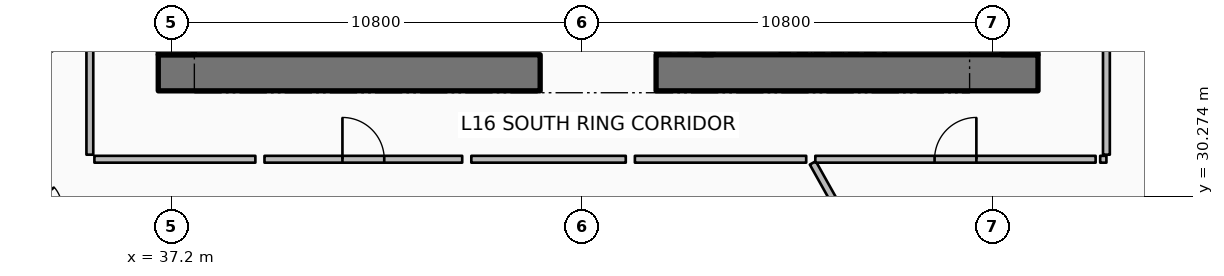
"""IFC4 building model, lengths in metres.
Left out: names, types, materials, properties, quantities, classifications, styles, units other than length and angle.
Written with IfcOpenShell. Run it as: python <this file> out.ifc"""

import sys

from ifc_helpers import new_model, si_unit, direction, frame, frame_2d, origin, place, context, subcontext, project, spatial, rectangle, extrude, element, fill, save


model = new_model("IFC4")
c1 = context("Model", 3, precision=1e-05, world=origin(), true_north=direction((0.0, 1.0)))
c2 = subcontext(c1, "Body", "Model", "MODEL_VIEW")
j1 = project(units=[si_unit("LENGTHUNIT", "METRE"), si_unit("PLANEANGLEUNIT", "RADIAN")], contexts=[c1])
p1 = place(None, origin())
s1 = spatial("IfcSite", under=j1, at=p1, CompositionType="ELEMENT")
p2 = place(p1, origin())
s2 = spatial("IfcBuilding", under=s1, at=p2, CompositionType="ELEMENT")
p3 = place(p2, frame((0.0, 0.0, 67.65)))
s3 = spatial("IfcBuildingStorey", under=s2, at=p3, CompositionType="ELEMENT", Elevation=67.65)
p4 = place(p3, frame((36.85, 33.525, 0.0), z_axis=(0.0, 0.0, 1.0), x_axis=(1.0, 0.0, 0.0)))
e1 = element("IfcWall", 1, at=p4, inside=s3, PredefinedType="SHEAR", context=c2, shape_type="SweptSolid", body=[
    extrude(rectangle(XDim=10.05, YDim=0.95, at=frame_2d((5.025, 0.0))), origin(), (0.0, 0.0, 1.0), 3.75),
])
p5 = place(p3, frame((49.95, 33.525, 0.0), z_axis=(0.0, 0.0, 1.0), x_axis=(1.0, 0.0, 0.0)))
e2 = element("IfcWall", 2, at=p5, inside=s3, PredefinedType="SHEAR", context=c2, shape_type="SweptSolid", body=[
    extrude(rectangle(XDim=10.05, YDim=0.95, at=frame_2d((5.025, 0.0))), origin(), (0.0, 0.0, 1.0), 3.75),
])
for number, where, z_axis, x_axis in (
    (3, (37.325, 34.0, 0.0), (0.0, 0.0, 1.0), (0.0, 1.0, 0.0)),
    (4, (59.525, 34.0, 0.0), (0.0, 0.0, 1.0), (0.0, 1.0, 0.0)),
):
    element("IfcWall", number, at=place(p3, frame(where, z_axis=z_axis, x_axis=x_axis)), inside=s3, PredefinedType="SHEAR", context=c2, shape_type="SweptSolid", body=[
        extrude(rectangle(XDim=16.0, YDim=0.95, at=frame_2d((8.0, 0.0))), origin(), (0.0, 0.0, 1.0), 3.75),
    ])
p6 = place(p3, frame((51.31, 34.0, 0.0), z_axis=(0.0, 0.0, 1.0), x_axis=(0.0, 1.0, 0.0)))
e5 = element("IfcWall", 5, at=p6, inside=s3, PredefinedType="SHEAR", context=c2, shape_type="SweptSolid", body=[
    extrude(rectangle(XDim=3.5, YDim=0.28, at=frame_2d((1.75, 0.0))), origin(), (0.0, 0.0, 1.0), 3.75),
])
p7 = place(p3, frame((34.954, 34.694, 0.0), z_axis=(0.0, 0.0, 1.0), x_axis=(-0.872493465611, -0.488625779577, 0.0)))
e6 = element("IfcWall", 6, at=p7, inside=s3, PredefinedType="PARTITIONING", context=c2, shape_type="SweptSolid", body=[
    extrude(rectangle(XDim=16.586, YDim=0.18, at=frame_2d((8.293, 0.0))), origin(), (0.0, 0.0, 1.0), 2.717),
])
p8 = place(p3, frame((54.074, 31.154, 0.0), z_axis=(0.0, 0.0, 1.0), x_axis=(0.48862612996, -0.872493269384, 0.0)))
e7 = element("IfcWall", 7, at=p8, inside=s3, PredefinedType="PARTITIONING", context=c2, shape_type="SweptSolid", body=[
    extrude(rectangle(XDim=13.065, YDim=0.18, at=frame_2d((6.532, 0.0))), origin(), (0.0, 0.0, 1.0), 2.717),
])
p9 = place(p3, frame((39.646, 31.25, 0.0), z_axis=(0.0, 0.0, 1.0), x_axis=(1.0, 0.0, 0.0)))
e8 = element("IfcWall", 8, at=p9, inside=s3, PredefinedType="PARTITIONING", context=c2, shape_type="SweptSolid", body=[
    extrude(rectangle(XDim=5.203, YDim=0.18, at=frame_2d((2.601, 0.0))), origin(), (0.0, 0.0, 1.0), 2.717),
])
p10 = place(p9, frame((2.052, 0.0, 0.0)))
e9 = element("IfcOpeningElement", 9, at=p10, cuts=e8, PredefinedType="OPENING", context=c2, shape_type="SweptSolid", body=[
    extrude(rectangle(XDim=1.1, YDim=2.1, at=frame_2d((0.55, 1.05))), frame((0.0, 0.1, 0.0), z_axis=(0.0, -1.0, 0.0), x_axis=(1.0, 0.0, 0.0)), (0.0, 0.0, 1.0), 0.2),
])
p11 = place(p3, frame((35.05, 34.628, 0.0), z_axis=(0.0, 0.0, 1.0), x_axis=(0.0, -1.0, 0.0)))
e10 = element("IfcWall", 10, at=p11, inside=s3, PredefinedType="PARTITIONING", context=c2, shape_type="SweptSolid", body=[
    extrude(rectangle(XDim=3.258, YDim=0.18, at=frame_2d((1.629, 0.0))), origin(), (0.0, 0.0, 1.0), 2.717),
])
p12 = place(p3, frame((35.17, 31.25, 0.0), z_axis=(0.0, 0.0, 1.0), x_axis=(1.0, 0.0, 0.0)))
e11 = element("IfcWall", 11, at=p12, inside=s3, PredefinedType="PARTITIONING", context=c2, shape_type="SweptSolid", body=[
    extrude(rectangle(XDim=4.236, YDim=0.18, at=frame_2d((2.118, 0.0))), origin(), (0.0, 0.0, 1.0), 2.717),
])
p13 = place(p3, frame((33.075, 30.413, 0.0), z_axis=(0.0, 0.0, 1.0), x_axis=(0.655021066846, -0.755610615322, 0.0)))
e12 = element("IfcWall", 12, at=p13, inside=s3, PredefinedType="PARTITIONING", context=c2, shape_type="SweptSolid", body=[
    extrude(rectangle(XDim=2.053, YDim=0.125, at=frame_2d((1.027, 0.0))), origin(), (0.0, 0.0, 1.0), 2.79),
])
p14 = place(p13, frame((0.602, 0.0, 0.0)))
e13 = element("IfcOpeningElement", 13, at=p14, cuts=e12, PredefinedType="OPENING", context=c2, shape_type="SweptSolid", body=[
    extrude(rectangle(XDim=0.85, YDim=2.06, at=frame_2d((0.425, 1.03))), frame((0.0, 0.073, 0.0), z_axis=(0.0, -1.0, 0.0), x_axis=(1.0, 0.0, 0.0)), (0.0, 0.0, 1.0), 0.145),
])
p15 = place(p3, frame((45.088, 31.25, 0.0), z_axis=(0.0, 0.0, 1.0), x_axis=(1.0, 0.0, 0.0)))
e14 = element("IfcWall", 14, at=p15, inside=s3, PredefinedType="PARTITIONING", context=c2, shape_type="SweptSolid", body=[
    extrude(rectangle(XDim=4.064, YDim=0.18, at=frame_2d((2.032, 0.0))), origin(), (0.0, 0.0, 1.0), 2.717),
])
p16 = place(p3, frame((49.392, 31.25, 0.0), z_axis=(0.0, 0.0, 1.0), x_axis=(1.0, 0.0, 0.0)))
e15 = element("IfcWall", 15, at=p16, inside=s3, PredefinedType="PARTITIONING", context=c2, shape_type="SweptSolid", body=[
    extrude(rectangle(XDim=4.508, YDim=0.18, at=frame_2d((2.254, 0.0))), origin(), (0.0, 0.0, 1.0), 2.717),
])
p17 = place(p3, frame((54.14, 31.25, 0.0), z_axis=(0.0, 0.0, 1.0), x_axis=(1.0, 0.0, 0.0)))
e16 = element("IfcWall", 16, at=p17, inside=s3, PredefinedType="PARTITIONING", context=c2, shape_type="SweptSolid", body=[
    extrude(rectangle(XDim=7.376, YDim=0.18, at=frame_2d((3.688, 0.0))), origin(), (0.0, 0.0, 1.0), 2.717),
])
p18 = place(p17, frame((3.138, 0.0, 0.0)))
e17 = element("IfcOpeningElement", 17, at=p18, cuts=e16, PredefinedType="OPENING", context=c2, shape_type="SweptSolid", body=[
    extrude(rectangle(XDim=1.1, YDim=2.1, at=frame_2d((0.55, 1.05))), frame((0.0, 0.1, 0.0), z_axis=(0.0, -1.0, 0.0), x_axis=(1.0, 0.0, 0.0)), (0.0, 0.0, 1.0), 0.2),
])
p19 = place(p3, frame((61.636, 31.25, 0.0), z_axis=(0.0, 0.0, 1.0), x_axis=(1.0, 0.0, 0.0)))
e18 = element("IfcWall", 18, at=p19, inside=s3, PredefinedType="PARTITIONING", context=c2, shape_type="SweptSolid", body=[
    extrude(rectangle(XDim=0.164, YDim=0.18, at=frame_2d((0.082, 0.0))), origin(), (0.0, 0.0, 1.0), 2.717),
])
p20 = place(p3, frame((61.8, 31.37, 0.0), z_axis=(0.0, 0.0, 1.0), x_axis=(0.0, 1.0, 0.0)))
e19 = element("IfcWall", 19, at=p20, inside=s3, PredefinedType="PARTITIONING", context=c2, shape_type="SweptSolid", body=[
    extrude(rectangle(XDim=6.618, YDim=0.18, at=frame_2d((3.309, 0.0))), origin(), (0.0, 0.0, 1.0), 2.717),
])
p21 = place(p10, origin())
e20 = element("IfcDoor", 20, at=p21, inside=s3, OperationType="SINGLE_SWING_LEFT", PredefinedType="DOOR", context=c2, shape_type="SweptSolid", body=[
    extrude(rectangle(XDim=1.1, YDim=2.1, at=frame_2d((0.55, 1.05))), frame((0.0, 0.025, 0.0), z_axis=(0.0, -1.0, 0.0), x_axis=(1.0, 0.0, 0.0)), (0.0, 0.0, 1.0), 0.05),
])
fill(e9, e20)
p22 = place(p18, origin())
e21 = element("IfcDoor", 21, at=p22, inside=s3, OperationType="SINGLE_SWING_RIGHT", PredefinedType="DOOR", context=c2, shape_type="SweptSolid", body=[
    extrude(rectangle(XDim=1.1, YDim=2.1, at=frame_2d((0.55, 1.05))), frame((0.0, 0.025, 0.0), z_axis=(0.0, -1.0, 0.0), x_axis=(1.0, 0.0, 0.0)), (0.0, 0.0, 1.0), 0.05),
])
fill(e17, e21)
save(model, sys.argv[1])
